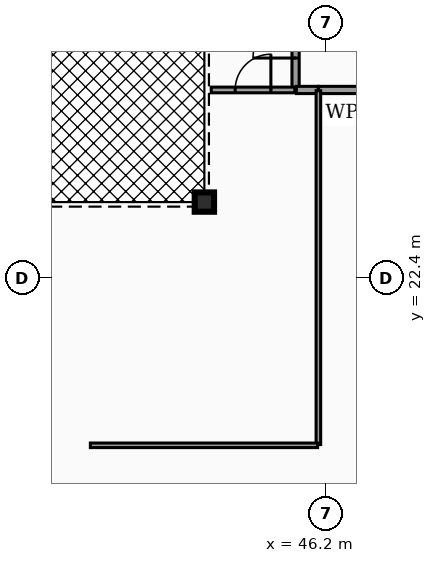
"""IFC4 building model, lengths in metres.
Left out: names, types, materials, properties, quantities, classifications, styles, units other than length and angle.
Written with IfcOpenShell. Run it as: python <this file> out.ifc"""

import sys

from ifc_helpers import new_model, si_unit, direction, frame, frame_2d, origin, origin_2d, place, context, subcontext, project, spatial, rectangle, hollow_circle, extrude, element, fill, save


model = new_model("IFC4")
c1 = context("Model", 3, precision=1e-05, world=origin(), true_north=direction((0.0, 1.0)))
c2 = subcontext(c1, "Body", "Model", "MODEL_VIEW")
j1 = project(units=[si_unit("LENGTHUNIT", "METRE"), si_unit("PLANEANGLEUNIT", "RADIAN")], contexts=[c1])
p1 = place(None, origin())
s1 = spatial("IfcSite", under=j1, at=p1, CompositionType="ELEMENT")
p2 = place(p1, origin())
s2 = spatial("IfcBuilding", under=s1, at=p2, CompositionType="ELEMENT")
p3 = place(p2, frame((0.0, 0.0, 13.94)))
s3 = spatial("IfcBuildingStorey", under=s2, at=p3, CompositionType="ELEMENT", Elevation=13.94)
p4 = place(p3, frame((43.0, 24.4, 0.0), z_axis=(0.0, 0.0, 1.0), x_axis=(1.0, 0.0, 0.0)))
e1 = element("IfcColumn", 1, at=p4, inside=s3, PredefinedType="COLUMN", context=c2, shape_type="SweptSolid", body=[
    extrude(hollow_circle(Radius=0.254, WallThickness=0.02, at=origin_2d()), origin(), (0.0, 0.0, 1.0), 4.14),
])
p5 = place(p3, frame((45.4, 27.37, 0.0), z_axis=(0.0, 0.0, 1.0), x_axis=(0.0, 1.0, 0.0)))
e2 = element("IfcWall", 2, at=p5, inside=s3, PredefinedType="PARTITIONING", context=c2, shape_type="SweptSolid", body=[
    extrude(rectangle(XDim=2.76, YDim=0.19, at=frame_2d((1.38, 0.0))), origin(), (0.0, 0.0, 1.0), 3.097),
])
p6 = place(p5, frame((0.82, 0.0, 0.0)))
e3 = element("IfcOpeningElement", 3, at=p6, cuts=e2, PredefinedType="OPENING", context=c2, shape_type="SweptSolid", body=[
    extrude(rectangle(XDim=1.12, YDim=2.05, at=frame_2d((0.56, 1.025))), frame((0.0, 0.105, 0.0), z_axis=(0.0, -1.0, 0.0), x_axis=(1.0, 0.0, 0.0)), (0.0, 0.0, 1.0), 0.21),
])
p7 = place(p3, frame((46.005, 27.35, 0.0), z_axis=(0.0, 0.0, 1.0), x_axis=(1.0, 0.0, 0.0)))
e4 = element("IfcWall", 4, at=p7, inside=s3, PredefinedType="PARTITIONING", context=c2, shape_type="SweptSolid", body=[
    extrude(rectangle(XDim=2.345, YDim=0.19, at=frame_2d((1.173, 0.0))), origin(), (0.0, 0.0, 1.0), 3.097),
])
p8 = place(p3, frame((45.42, 27.35, 0.0), z_axis=(0.0, 0.0, 1.0), x_axis=(1.0, 0.0, 0.0)))
e5 = element("IfcWall", 5, at=p8, inside=s3, PredefinedType="PARTITIONING", context=c2, shape_type="SweptSolid", body=[
    extrude(rectangle(XDim=0.575, YDim=0.19, at=frame_2d((0.288, 0.0))), origin(), (0.0, 0.0, 1.0), 3.097),
])
p9 = place(p3, frame((43.18, 27.35, 0.0), z_axis=(0.0, 0.0, 1.0), x_axis=(1.0, 0.0, 0.0)))
e6 = element("IfcWall", 6, at=p9, inside=s3, PredefinedType="PARTITIONING", context=c2, shape_type="SweptSolid", body=[
    extrude(rectangle(XDim=2.2, YDim=0.15, at=frame_2d((1.1, 0.0))), origin(), (0.0, 0.0, 1.0), 3.097),
])
p10 = place(p9, frame((0.63, 0.0, 0.0)))
e7 = element("IfcOpeningElement", 7, at=p10, cuts=e6, PredefinedType="OPENING", context=c2, shape_type="SweptSolid", body=[
    extrude(rectangle(XDim=0.94, YDim=2.05, at=frame_2d((0.47, 1.025))), frame((0.0, 0.085, 0.0), z_axis=(0.0, -1.0, 0.0), x_axis=(1.0, 0.0, 0.0)), (0.0, 0.0, 1.0), 0.17),
])
p11 = place(p3, frame((46.0, 18.02, 0.0), z_axis=(0.0, 0.0, 1.0), x_axis=(0.0, 1.0, 0.0)))
e8 = element("IfcWall", 8, at=p11, inside=s3, PredefinedType="PARTITIONING", context=c2, shape_type="SweptSolid", body=[
    extrude(rectangle(XDim=9.31, YDim=0.12, at=frame_2d((4.655, 0.0))), origin(), (0.0, 0.0, 1.0), 3.097),
])
p12 = place(p3, frame((40.0, 18.0, 0.0), z_axis=(0.0, 0.0, 1.0), x_axis=(1.0, 0.0, 0.0)))
e9 = element("IfcWall", 9, at=p12, inside=s3, PredefinedType="PARTITIONING", context=c2, shape_type="SweptSolid", body=[
    extrude(rectangle(XDim=5.98, YDim=0.12, at=frame_2d((2.99, 0.0))), origin(), (0.0, 0.0, 1.0), 3.097),
])
p13 = place(p6, origin())
e10 = element("IfcDoor", 10, at=p13, inside=s3, OperationType="SINGLE_SWING_LEFT", PredefinedType="DOOR", context=c2, shape_type="SweptSolid", body=[
    extrude(rectangle(XDim=1.12, YDim=2.05, at=frame_2d((0.56, 1.025))), frame((0.0, 0.025, 0.0), z_axis=(0.0, -1.0, 0.0), x_axis=(1.0, 0.0, 0.0)), (0.0, 0.0, 1.0), 0.05),
])
fill(e3, e10)
p14 = place(p10, origin())
e11 = element("IfcDoor", 11, at=p14, inside=s3, OperationType="SINGLE_SWING_RIGHT", PredefinedType="DOOR", context=c2, shape_type="SweptSolid", body=[
    extrude(rectangle(XDim=0.94, YDim=2.05, at=frame_2d((0.47, 1.025))), frame((0.0, 0.025, 0.0), z_axis=(0.0, -1.0, 0.0), x_axis=(1.0, 0.0, 0.0)), (0.0, 0.0, 1.0), 0.05),
])
fill(e7, e11)
save(model, sys.argv[1])
